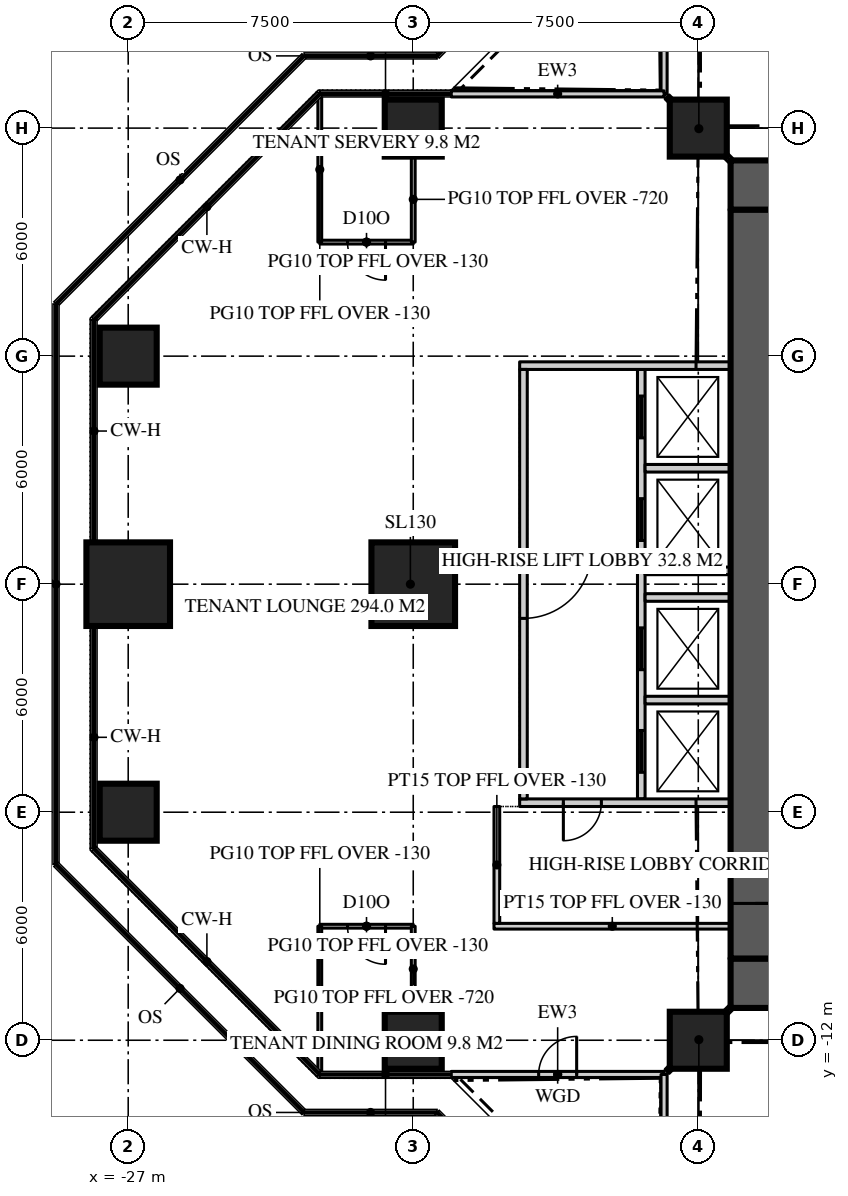
"""IFC4 building model, lengths in metres.
Left out: names, types, materials, properties, quantities, classifications, styles, units other than length and angle.
Written with IfcOpenShell. Run it as: python <this file> out.ifc"""

import sys

from ifc_helpers import new_model, si_unit, direction, frame, frame_2d, origin, origin_2d, place, context, subcontext, project, spatial, rectangle, extrude, element, fill, save


model = new_model("IFC4")
c1 = context("Model", 3, precision=1e-05, world=origin(), true_north=direction((0.0, 1.0)))
c2 = subcontext(c1, "Body", "Model", "MODEL_VIEW")
j1 = project(units=[si_unit("LENGTHUNIT", "METRE"), si_unit("PLANEANGLEUNIT", "RADIAN")], contexts=[c1])
p1 = place(None, origin())
s1 = spatial("IfcSite", under=j1, at=p1, CompositionType="ELEMENT")
p2 = place(p1, origin())
s2 = spatial("IfcBuilding", under=s1, at=p2, CompositionType="ELEMENT")
p3 = place(p2, frame((0.0, 0.0, 259.5)))
s3 = spatial("IfcBuildingStorey", under=s2, at=p3, CompositionType="ELEMENT", Elevation=259.5)
p4 = place(p3, frame((-11.15, 10.5, 0.0), z_axis=(0.0, 0.0, 1.0), x_axis=(1.0, 0.0, 0.0)))
e1 = element("IfcWall", 1, at=p4, inside=s3, PredefinedType="SHEAR", context=c2, shape_type="SweptSolid", body=[
    extrude(rectangle(XDim=22.3, YDim=1.3, at=frame_2d((11.15, 0.0))), origin(), (0.0, 0.0, 1.0), 3.9),
])
p5 = place(p4, frame((4.25, 0.0, 0.0)))
e2 = element("IfcOpeningElement", 2, at=p5, cuts=e1, PredefinedType="OPENING", context=c2, shape_type="SweptSolid", body=[
    extrude(rectangle(XDim=1.8, YDim=2.2, at=frame_2d((0.9, 1.1))), frame((0.0, 0.66, 0.0), z_axis=(0.0, -1.0, 0.0), x_axis=(1.0, 0.0, 0.0)), (0.0, 0.0, 1.0), 1.32),
])
p6 = place(p4, frame((16.25, 0.0, 0.0)))
e3 = element("IfcOpeningElement", 3, at=p6, cuts=e1, PredefinedType="OPENING", context=c2, shape_type="SweptSolid", body=[
    extrude(rectangle(XDim=1.8, YDim=2.2, at=frame_2d((0.9, 1.1))), frame((0.0, 0.66, 0.0), z_axis=(0.0, -1.0, 0.0), x_axis=(1.0, 0.0, 0.0)), (0.0, 0.0, 1.0), 1.32),
])
p7 = place(p3, frame((11.15, -10.5, 0.0), z_axis=(0.0, 0.0, 1.0), x_axis=(-1.0, 0.0, 0.0)))
e4 = element("IfcWall", 4, at=p7, inside=s3, PredefinedType="SHEAR", context=c2, shape_type="SweptSolid", body=[
    extrude(rectangle(XDim=22.3, YDim=1.3, at=frame_2d((11.15, 0.0))), origin(), (0.0, 0.0, 1.0), 3.9),
])
p8 = place(p7, frame((16.25, 0.0, 0.0)))
e5 = element("IfcOpeningElement", 5, at=p8, cuts=e4, PredefinedType="OPENING", context=c2, shape_type="SweptSolid", body=[
    extrude(rectangle(XDim=1.8, YDim=2.2, at=frame_2d((0.9, 1.1))), frame((0.0, 0.66, 0.0), z_axis=(0.0, -1.0, 0.0), x_axis=(1.0, 0.0, 0.0)), (0.0, 0.0, 1.0), 1.32),
])
p9 = place(p7, frame((4.25, 0.0, 0.0)))
e6 = element("IfcOpeningElement", 6, at=p9, cuts=e4, PredefinedType="OPENING", context=c2, shape_type="SweptSolid", body=[
    extrude(rectangle(XDim=1.8, YDim=2.2, at=frame_2d((0.9, 1.1))), frame((0.0, 0.66, 0.0), z_axis=(0.0, -1.0, 0.0), x_axis=(1.0, 0.0, 0.0)), (0.0, 0.0, 1.0), 1.32),
])
p10 = place(p3, frame((-10.5, 9.85, 0.0), z_axis=(0.0, 0.0, 1.0), x_axis=(0.0, -1.0, 0.0)))
e7 = element("IfcWall", 7, at=p10, inside=s3, PredefinedType="SHEAR", context=c2, shape_type="SweptSolid", body=[
    extrude(rectangle(XDim=19.7, YDim=1.3, at=frame_2d((9.85, 0.0))), origin(), (0.0, 0.0, 1.0), 3.9),
])
p11 = place(p10, frame((17.25, 0.0, 0.0)))
e8 = element("IfcOpeningElement", 8, at=p11, cuts=e7, PredefinedType="OPENING", context=c2, shape_type="SweptSolid", body=[
    extrude(rectangle(XDim=1.0, YDim=2.2, at=frame_2d((0.5, 1.1))), frame((0.0, 0.66, 0.0), z_axis=(0.0, -1.0, 0.0), x_axis=(1.0, 0.0, 0.0)), (0.0, 0.0, 1.0), 1.32),
])
for number, where, z_axis, x_axis in (
    (9, (-19.5, -12.0, 0.0), (0.0, 0.0, 1.0), (1.0, 0.0, 0.0)),
    (10, (-12.0, -12.0, 0.0), (0.0, 0.0, 1.0), (1.0, 0.0, 0.0)),
    (11, (-27.0, -6.0, 0.0), (0.0, 0.0, 1.0), (1.0, 0.0, 0.0)),
):
    element("IfcColumn", number, at=place(p3, frame(where, z_axis=z_axis, x_axis=x_axis)), inside=s3, PredefinedType="COLUMN", context=c2, shape_type="SweptSolid", body=[
        extrude(rectangle(XDim=1.5, YDim=1.5, at=origin_2d()), origin(), (0.0, 0.0, 1.0), 3.9),
    ])
for number, where, z_axis, x_axis in (
    (12, (-27.0, 0.0, 0.0), (0.0, 0.0, 1.0), (1.0, 0.0, 0.0)),
    (13, (-19.5, 0.0, 0.0), (0.0, 0.0, 1.0), (1.0, 0.0, 0.0)),
):
    element("IfcColumn", number, at=place(p3, frame(where, z_axis=z_axis, x_axis=x_axis)), inside=s3, PredefinedType="COLUMN", context=c2, shape_type="SweptSolid", body=[
        extrude(rectangle(XDim=2.2, YDim=2.2, at=origin_2d()), origin(), (0.0, 0.0, 1.0), 3.9),
    ])
for number, where, z_axis, x_axis in (
    (14, (-27.0, 6.0, 0.0), (0.0, 0.0, 1.0), (1.0, 0.0, 0.0)),
    (15, (-19.5, 12.0, 0.0), (0.0, 0.0, 1.0), (1.0, 0.0, 0.0)),
    (16, (-12.0, 12.0, 0.0), (0.0, 0.0, 1.0), (1.0, 0.0, 0.0)),
):
    element("IfcColumn", number, at=place(p3, frame(where, z_axis=z_axis, x_axis=x_axis)), inside=s3, PredefinedType="COLUMN", context=c2, shape_type="SweptSolid", body=[
        extrude(rectangle(XDim=1.5, YDim=1.5, at=origin_2d()), origin(), (0.0, 0.0, 1.0), 3.9),
    ])
p12 = place(p3, frame((-12.9, 18.5, 0.0), z_axis=(0.0, 0.0, 1.0), x_axis=(0.0, -1.0, 0.0)))
e17 = element("IfcWall", 17, at=p12, inside=s3, PredefinedType="SOLIDWALL", context=c2, shape_type="SweptSolid", body=[
    extrude(rectangle(XDim=5.6, YDim=0.16, at=frame_2d((2.8, 0.0))), origin(), (0.0, 0.0, 1.0), 3.77),
])
p13 = place(p12, frame((2.3, 0.0, 0.0)))
e18 = element("IfcOpeningElement", 18, at=p13, cuts=e17, PredefinedType="OPENING", context=c2, shape_type="SweptSolid", body=[
    extrude(rectangle(XDim=1.0, YDim=2.2, at=frame_2d((0.5, 1.1))), frame((0.0, 0.09, 0.0), z_axis=(0.0, -1.0, 0.0), x_axis=(1.0, 0.0, 0.0)), (0.0, 0.0, 1.0), 0.18),
])
p14 = place(p3, frame((-12.9, 12.9, 0.0), z_axis=(0.0, 0.0, 1.0), x_axis=(-1.0, 0.0, 0.0)))
e19 = element("IfcWall", 19, at=p14, inside=s3, PredefinedType="SOLIDWALL", context=c2, shape_type="SweptSolid", body=[
    extrude(rectangle(XDim=5.6, YDim=0.16, at=frame_2d((2.8, 0.0))), origin(), (0.0, 0.0, 1.0), 3.77),
])
p15 = place(p3, frame((-18.5, -12.9, 0.0), z_axis=(0.0, 0.0, 1.0), x_axis=(1.0, 0.0, 0.0)))
e20 = element("IfcWall", 20, at=p15, inside=s3, PredefinedType="SOLIDWALL", context=c2, shape_type="SweptSolid", body=[
    extrude(rectangle(XDim=5.6, YDim=0.16, at=frame_2d((2.8, 0.0))), origin(), (0.0, 0.0, 1.0), 3.77),
])
p16 = place(p15, frame((2.3, 0.0, 0.0)))
e21 = element("IfcOpeningElement", 21, at=p16, cuts=e20, PredefinedType="OPENING", context=c2, shape_type="SweptSolid", body=[
    extrude(rectangle(XDim=1.0, YDim=2.2, at=frame_2d((0.5, 1.1))), frame((0.0, 0.09, 0.0), z_axis=(0.0, -1.0, 0.0), x_axis=(1.0, 0.0, 0.0)), (0.0, 0.0, 1.0), 0.18),
])
p17 = place(p3, frame((-12.9, -12.9, 0.0), z_axis=(0.0, 0.0, 1.0), x_axis=(0.0, -1.0, 0.0)))
e22 = element("IfcWall", 22, at=p17, inside=s3, PredefinedType="SOLIDWALL", context=c2, shape_type="SweptSolid", body=[
    extrude(rectangle(XDim=5.6, YDim=0.16, at=frame_2d((2.8, 0.0))), origin(), (0.0, 0.0, 1.0), 3.77),
])
p18 = place(p3, frame((-19.5, -9.0, 0.0), z_axis=(0.0, 0.0, 1.0), x_axis=(-1.0, 0.0, 0.0)))
e23 = element("IfcWall", 23, at=p18, inside=s3, PredefinedType="PARTITIONING", context=c2, shape_type="SweptSolid", body=[
    extrude(rectangle(XDim=2.459, YDim=0.1, at=frame_2d((1.229, 0.0))), origin(), (0.0, 0.0, 1.0), 3.77),
])
p19 = place(p18, frame((0.729, 0.0, 0.0)))
e24 = element("IfcOpeningElement", 24, at=p19, cuts=e23, PredefinedType="OPENING", context=c2, shape_type="SweptSolid", body=[
    extrude(rectangle(XDim=1.0, YDim=2.2, at=frame_2d((0.5, 1.1))), frame((0.0, 0.06, 0.0), z_axis=(0.0, -1.0, 0.0), x_axis=(1.0, 0.0, 0.0)), (0.0, 0.0, 1.0), 0.12),
])
p20 = place(p3, frame((-19.5, -9.0, 0.0), z_axis=(0.0, 0.0, 1.0), x_axis=(0.0, -1.0, 0.0)))
e25 = element("IfcWall", 25, at=p20, inside=s3, PredefinedType="PARTITIONING", context=c2, shape_type="SweptSolid", body=[
    extrude(rectangle(XDim=2.25, YDim=0.1, at=frame_2d((1.125, 0.0))), origin(), (0.0, 0.0, 1.0), 3.18),
])
p21 = place(p3, frame((-21.959, -9.0, 0.0), z_axis=(0.0, 0.0, 1.0), x_axis=(0.0, -1.0, 0.0)))
e26 = element("IfcWall", 26, at=p21, inside=s3, PredefinedType="PARTITIONING", context=c2, shape_type="SweptSolid", body=[
    extrude(rectangle(XDim=3.82, YDim=0.1, at=frame_2d((1.91, 0.0))), origin(), (0.0, 0.0, 1.0), 3.77),
])
p22 = place(p3, frame((-19.5, 9.0, 0.0), z_axis=(0.0, 0.0, 1.0), x_axis=(-1.0, 0.0, 0.0)))
e27 = element("IfcWall", 27, at=p22, inside=s3, PredefinedType="PARTITIONING", context=c2, shape_type="SweptSolid", body=[
    extrude(rectangle(XDim=2.459, YDim=0.1, at=frame_2d((1.229, 0.0))), origin(), (0.0, 0.0, 1.0), 3.77),
])
p23 = place(p22, frame((0.729, 0.0, 0.0)))
e28 = element("IfcOpeningElement", 28, at=p23, cuts=e27, PredefinedType="OPENING", context=c2, shape_type="SweptSolid", body=[
    extrude(rectangle(XDim=1.0, YDim=2.2, at=frame_2d((0.5, 1.1))), frame((0.0, 0.06, 0.0), z_axis=(0.0, -1.0, 0.0), x_axis=(1.0, 0.0, 0.0)), (0.0, 0.0, 1.0), 0.12),
])
p24 = place(p3, frame((-19.5, 9.0, 0.0), z_axis=(0.0, 0.0, 1.0), x_axis=(0.0, 1.0, 0.0)))
e29 = element("IfcWall", 29, at=p24, inside=s3, PredefinedType="PARTITIONING", context=c2, shape_type="SweptSolid", body=[
    extrude(rectangle(XDim=2.25, YDim=0.1, at=frame_2d((1.125, 0.0))), origin(), (0.0, 0.0, 1.0), 3.18),
])
p25 = place(p3, frame((-21.959, 9.0, 0.0), z_axis=(0.0, 0.0, 1.0), x_axis=(0.0, 1.0, 0.0)))
e30 = element("IfcWall", 30, at=p25, inside=s3, PredefinedType="PARTITIONING", context=c2, shape_type="SweptSolid", body=[
    extrude(rectangle(XDim=3.82, YDim=0.1, at=frame_2d((1.91, 0.0))), origin(), (0.0, 0.0, 1.0), 3.77),
])
p26 = place(p3, frame((-13.5, 5.65, 0.0), z_axis=(0.0, 0.0, 1.0), x_axis=(0.0, -1.0, 0.0)))
e31 = element("IfcWall", 31, at=p26, inside=s3, PredefinedType="SOLIDWALL", context=c2, shape_type="SweptSolid", body=[
    extrude(rectangle(XDim=11.3, YDim=0.2, at=frame_2d((5.65, 0.0))), origin(), (0.0, 0.0, 1.0), 3.7),
])
p27 = place(p26, frame((0.7, 0.0, 0.0)))
e32 = element("IfcOpeningElement", 32, at=p27, cuts=e31, PredefinedType="OPENING", context=c2, shape_type="SweptSolid", body=[
    extrude(rectangle(XDim=1.1, YDim=2.2, at=frame_2d((0.55, 1.1))), frame((0.0, 0.11, 0.0), z_axis=(0.0, -1.0, 0.0), x_axis=(1.0, 0.0, 0.0)), (0.0, 0.0, 1.0), 0.22),
])
p28 = place(p26, frame((3.4, 0.0, 0.0)))
e33 = element("IfcOpeningElement", 33, at=p28, cuts=e31, PredefinedType="OPENING", context=c2, shape_type="SweptSolid", body=[
    extrude(rectangle(XDim=1.1, YDim=2.2, at=frame_2d((0.55, 1.1))), frame((0.0, 0.11, 0.0), z_axis=(0.0, -1.0, 0.0), x_axis=(1.0, 0.0, 0.0)), (0.0, 0.0, 1.0), 0.22),
])
p29 = place(p26, frame((6.8, 0.0, 0.0)))
e34 = element("IfcOpeningElement", 34, at=p29, cuts=e31, PredefinedType="OPENING", context=c2, shape_type="SweptSolid", body=[
    extrude(rectangle(XDim=1.1, YDim=2.2, at=frame_2d((0.55, 1.1))), frame((0.0, 0.11, 0.0), z_axis=(0.0, -1.0, 0.0), x_axis=(1.0, 0.0, 0.0)), (0.0, 0.0, 1.0), 0.22),
])
p30 = place(p26, frame((9.5, 0.0, 0.0)))
e35 = element("IfcOpeningElement", 35, at=p30, cuts=e31, PredefinedType="OPENING", context=c2, shape_type="SweptSolid", body=[
    extrude(rectangle(XDim=1.1, YDim=2.2, at=frame_2d((0.55, 1.1))), frame((0.0, 0.11, 0.0), z_axis=(0.0, -1.0, 0.0), x_axis=(1.0, 0.0, 0.0)), (0.0, 0.0, 1.0), 0.22),
])
p31 = place(p3, frame((-11.15, 5.75, 0.0), z_axis=(0.0, 0.0, 1.0), x_axis=(-1.0, 0.0, 0.0)))
e36 = element("IfcWall", 36, at=p31, inside=s3, PredefinedType="SOLIDWALL", context=c2, shape_type="SweptSolid", body=[
    extrude(rectangle(XDim=5.55, YDim=0.2, at=frame_2d((2.775, 0.0))), origin(), (0.0, 0.0, 1.0), 3.7),
])
p32 = place(p3, frame((-11.15, -5.75, 0.0), z_axis=(0.0, 0.0, 1.0), x_axis=(-1.0, 0.0, 0.0)))
e37 = element("IfcWall", 37, at=p32, inside=s3, PredefinedType="SOLIDWALL", context=c2, shape_type="SweptSolid", body=[
    extrude(rectangle(XDim=5.55, YDim=0.2, at=frame_2d((2.775, 0.0))), origin(), (0.0, 0.0, 1.0), 3.7),
])
p33 = place(p32, frame((3.4, 0.0, 0.0)))
e38 = element("IfcOpeningElement", 38, at=p33, cuts=e37, PredefinedType="OPENING", context=c2, shape_type="SweptSolid", body=[
    extrude(rectangle(XDim=1.0, YDim=2.2, at=frame_2d((0.5, 1.1))), frame((0.0, 0.11, 0.0), z_axis=(0.0, -1.0, 0.0), x_axis=(1.0, 0.0, 0.0)), (0.0, 0.0, 1.0), 0.22),
])
for number, where, z_axis, x_axis in (
    (39, (-11.15, 3.05, 0.0), (0.0, 0.0, 1.0), (-1.0, 0.0, 0.0)),
    (40, (-11.15, 0.35, 0.0), (0.0, 0.0, 1.0), (-1.0, 0.0, 0.0)),
    (41, (-11.15, -0.35, 0.0), (0.0, 0.0, 1.0), (-1.0, 0.0, 0.0)),
    (42, (-11.15, -3.05, 0.0), (0.0, 0.0, 1.0), (-1.0, 0.0, 0.0)),
):
    element("IfcWall", number, at=place(p3, frame(where, z_axis=z_axis, x_axis=x_axis)), inside=s3, PredefinedType="SOLIDWALL", context=c2, shape_type="SweptSolid", body=[
        extrude(rectangle(XDim=2.25, YDim=0.2, at=frame_2d((1.125, 0.0))), origin(), (0.0, 0.0, 1.0), 3.7),
    ])
p34 = place(p3, frame((-16.6, 5.65, 0.0), z_axis=(0.0, 0.0, 1.0), x_axis=(0.0, -1.0, 0.0)))
e43 = element("IfcWall", 43, at=p34, inside=s3, PredefinedType="SOLIDWALL", context=c2, shape_type="SweptSolid", body=[
    extrude(rectangle(XDim=11.3, YDim=0.2, at=frame_2d((5.65, 0.0))), origin(), (0.0, 0.0, 1.0), 3.18),
])
p35 = place(p34, frame((4.75, 0.0, 0.0)))
e44 = element("IfcOpeningElement", 44, at=p35, cuts=e43, PredefinedType="OPENING", context=c2, shape_type="SweptSolid", body=[
    extrude(rectangle(XDim=1.8, YDim=2.2, at=frame_2d((0.9, 1.1))), frame((0.0, 0.11, 0.0), z_axis=(0.0, -1.0, 0.0), x_axis=(1.0, 0.0, 0.0)), (0.0, 0.0, 1.0), 0.22),
])
for number, where, z_axis, x_axis in (
    (45, (-11.15, 11.15, 0.0), (0.0, 0.0, 1.0), (-0.707, 0.707, 0.0)),
    (46, (-11.15, -11.15, 0.0), (0.0, 0.0, 1.0), (-0.707, -0.707, 0.0)),
):
    element("IfcWall", number, at=place(p3, frame(where, z_axis=z_axis, x_axis=x_axis)), inside=s3, PredefinedType="PARTITIONING", context=c2, shape_type="SweptSolid", body=[
        extrude(rectangle(XDim=2.362, YDim=0.15, at=frame_2d((1.181, 0.0))), origin(), (0.0, 0.0, 1.0), 3.22),
    ])
p36 = place(p3, frame((-11.15, -9.0, 0.0), z_axis=(0.0, 0.0, 1.0), x_axis=(-1.0, 0.0, 0.0)))
e47 = element("IfcWall", 47, at=p36, inside=s3, PredefinedType="PARTITIONING", context=c2, shape_type="SweptSolid", body=[
    extrude(rectangle(XDim=6.225, YDim=0.15, at=frame_2d((3.113, 0.0))), origin(), (0.0, 0.0, 1.0), 3.77),
])
p37 = place(p3, frame((-17.3, -5.85, 0.0), z_axis=(0.0, 0.0, 1.0), x_axis=(0.0, -1.0, 0.0)))
e48 = element("IfcWall", 48, at=p37, inside=s3, PredefinedType="PARTITIONING", context=c2, shape_type="SweptSolid", body=[
    extrude(rectangle(XDim=3.075, YDim=0.15, at=frame_2d((1.538, 0.0))), origin(), (0.0, 0.0, 1.0), 3.77),
])
p38 = place(p16, origin())
e49 = element("IfcDoor", 49, at=p38, inside=s3, OperationType="SINGLE_SWING_RIGHT", PredefinedType="DOOR", context=c2, shape_type="SweptSolid", body=[
    extrude(rectangle(XDim=1.0, YDim=2.2, at=frame_2d((0.5, 1.1))), frame((0.0, 0.025, 0.0), z_axis=(0.0, -1.0, 0.0), x_axis=(1.0, 0.0, 0.0)), (0.0, 0.0, 1.0), 0.05),
])
fill(e21, e49)
p39 = place(p11, origin())
e50 = element("IfcDoor", 50, at=p39, inside=s3, OperationType="SINGLE_SWING_RIGHT", PredefinedType="DOOR", context=c2, shape_type="SweptSolid", body=[
    extrude(rectangle(XDim=1.0, YDim=2.2, at=frame_2d((0.5, 1.1))), frame((0.0, 0.025, 0.0), z_axis=(0.0, -1.0, 0.0), x_axis=(1.0, 0.0, 0.0)), (0.0, 0.0, 1.0), 0.05),
])
fill(e8, e50)
p40 = place(p19, origin())
e51 = element("IfcDoor", 51, at=p40, inside=s3, OperationType="SINGLE_SWING_LEFT", PredefinedType="DOOR", context=c2, shape_type="SweptSolid", body=[
    extrude(rectangle(XDim=1.0, YDim=2.2, at=frame_2d((0.5, 1.1))), frame((0.0, 0.025, 0.0), z_axis=(0.0, -1.0, 0.0), x_axis=(1.0, 0.0, 0.0)), (0.0, 0.0, 1.0), 0.05),
])
fill(e24, e51)
p41 = place(p23, origin())
e52 = element("IfcDoor", 52, at=p41, inside=s3, OperationType="SINGLE_SWING_LEFT", PredefinedType="DOOR", context=c2, shape_type="SweptSolid", body=[
    extrude(rectangle(XDim=1.0, YDim=2.2, at=frame_2d((0.5, 1.1))), frame((0.0, 0.025, 0.0), z_axis=(0.0, -1.0, 0.0), x_axis=(1.0, 0.0, 0.0)), (0.0, 0.0, 1.0), 0.05),
])
fill(e28, e52)
p42 = place(p35, origin())
e53 = element("IfcDoor", 53, at=p42, inside=s3, OperationType="DOUBLE_DOOR_DOUBLE_SWING", PredefinedType="DOOR", context=c2, shape_type="SweptSolid", body=[
    extrude(rectangle(XDim=1.8, YDim=2.2, at=frame_2d((0.9, 1.1))), frame((0.0, 0.025, 0.0), z_axis=(0.0, -1.0, 0.0), x_axis=(1.0, 0.0, 0.0)), (0.0, 0.0, 1.0), 0.05),
])
fill(e44, e53)
p43 = place(p27, origin())
e54 = element("IfcDoor", 54, at=p43, inside=s3, OperationType="SLIDING_TO_LEFT", PredefinedType="DOOR", context=c2, shape_type="SweptSolid", body=[
    extrude(rectangle(XDim=1.1, YDim=2.2, at=frame_2d((0.55, 1.1))), frame((0.0, 0.025, 0.0), z_axis=(0.0, -1.0, 0.0), x_axis=(1.0, 0.0, 0.0)), (0.0, 0.0, 1.0), 0.05),
])
fill(e32, e54)
p44 = place(p28, origin())
e55 = element("IfcDoor", 55, at=p44, inside=s3, OperationType="SLIDING_TO_LEFT", PredefinedType="DOOR", context=c2, shape_type="SweptSolid", body=[
    extrude(rectangle(XDim=1.1, YDim=2.2, at=frame_2d((0.55, 1.1))), frame((0.0, 0.025, 0.0), z_axis=(0.0, -1.0, 0.0), x_axis=(1.0, 0.0, 0.0)), (0.0, 0.0, 1.0), 0.05),
])
fill(e33, e55)
p45 = place(p29, origin())
e56 = element("IfcDoor", 56, at=p45, inside=s3, OperationType="SLIDING_TO_LEFT", PredefinedType="DOOR", context=c2, shape_type="SweptSolid", body=[
    extrude(rectangle(XDim=1.1, YDim=2.2, at=frame_2d((0.55, 1.1))), frame((0.0, 0.025, 0.0), z_axis=(0.0, -1.0, 0.0), x_axis=(1.0, 0.0, 0.0)), (0.0, 0.0, 1.0), 0.05),
])
fill(e34, e56)
p46 = place(p30, origin())
e57 = element("IfcDoor", 57, at=p46, inside=s3, OperationType="SLIDING_TO_LEFT", PredefinedType="DOOR", context=c2, shape_type="SweptSolid", body=[
    extrude(rectangle(XDim=1.1, YDim=2.2, at=frame_2d((0.55, 1.1))), frame((0.0, 0.025, 0.0), z_axis=(0.0, -1.0, 0.0), x_axis=(1.0, 0.0, 0.0)), (0.0, 0.0, 1.0), 0.05),
])
fill(e35, e57)
p47 = place(p33, origin())
e58 = element("IfcDoor", 58, at=p47, inside=s3, OperationType="SINGLE_SWING_RIGHT", PredefinedType="DOOR", context=c2, shape_type="SweptSolid", body=[
    extrude(rectangle(XDim=1.0, YDim=2.2, at=frame_2d((0.5, 1.1))), frame((0.0, 0.025, 0.0), z_axis=(0.0, -1.0, 0.0), x_axis=(1.0, 0.0, 0.0)), (0.0, 0.0, 1.0), 0.05),
])
fill(e38, e58)
save(model, sys.argv[1])
